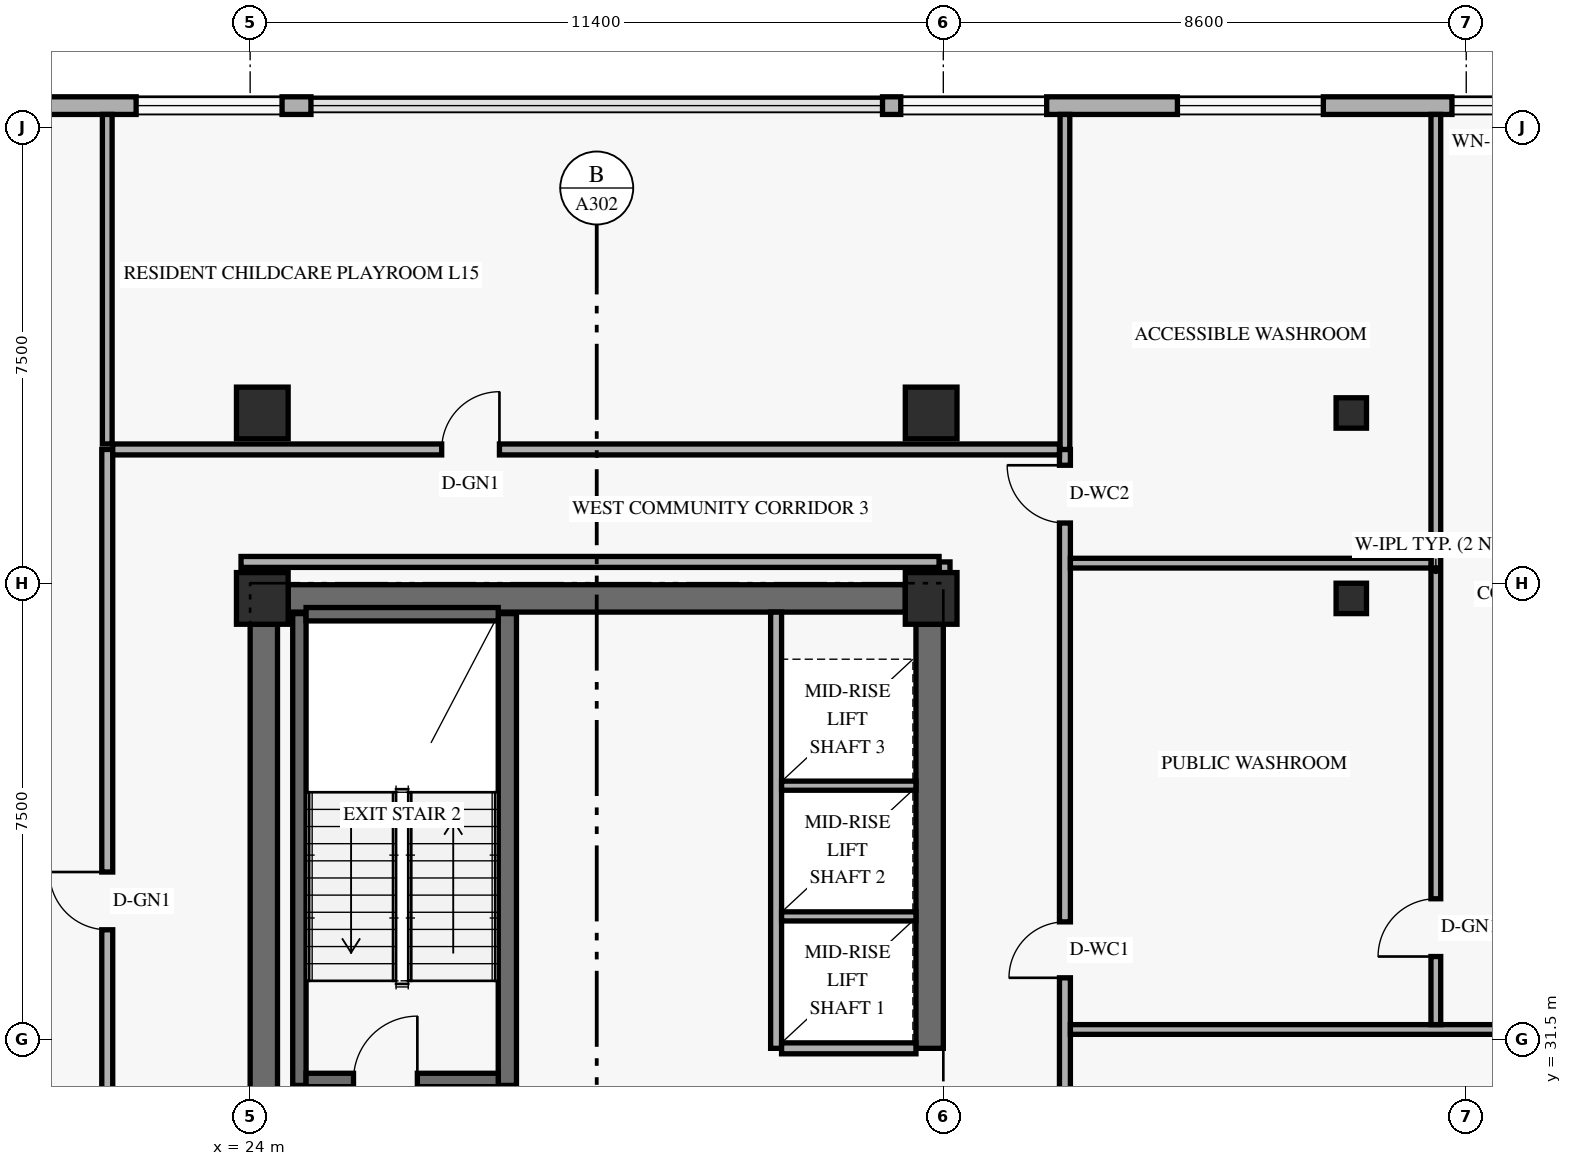
"""IFC4 building model, lengths in metres.
Left out: names, types, materials, properties, quantities, classifications, styles, units other than length and angle.
Written with IfcOpenShell. Run it as: python <this file> out.ifc"""

import sys

from ifc_helpers import new_model, si_unit, direction, frame, frame_2d, origin, origin_2d, place, context, subcontext, project, spatial, rectangle, hollow_rectangle, extrude, element, fill, save


model = new_model("IFC4")
c1 = context("Model", 3, precision=1e-05, world=origin(), true_north=direction((0.0, 1.0)))
c2 = subcontext(c1, "Body", "Model", "MODEL_VIEW")
j1 = project(units=[si_unit("LENGTHUNIT", "METRE"), si_unit("PLANEANGLEUNIT", "RADIAN")], contexts=[c1])
p1 = place(None, origin())
s1 = spatial("IfcSite", under=j1, at=p1, CompositionType="ELEMENT")
p2 = place(p1, origin())
s2 = spatial("IfcBuilding", under=s1, at=p2, CompositionType="ELEMENT")
p3 = place(p2, frame((0.0, 0.0, 60.0)))
s3 = spatial("IfcBuildingStorey", under=s2, at=p3, CompositionType="ELEMENT", Elevation=60.0)
p4 = place(p3, frame((24.225, 30.625, 0.0), z_axis=(0.0, 0.0, 1.0), x_axis=(0.0, 1.0, 0.0)))
e1 = element("IfcWall", 1, at=p4, inside=s3, PredefinedType="SHEAR", context=c2, shape_type="SweptSolid", body=[
    extrude(rectangle(XDim=7.7, YDim=0.45, at=frame_2d((3.85, 0.0))), origin(), (0.0, 0.0, 1.0), 3.267),
])
p5 = place(p3, frame((35.175, 31.35, 0.0), z_axis=(0.0, 0.0, 1.0), x_axis=(0.0, 1.0, 0.0)))
e2 = element("IfcWall", 2, at=p5, inside=s3, PredefinedType="SHEAR", context=c2, shape_type="SweptSolid", body=[
    extrude(rectangle(XDim=6.975, YDim=0.45, at=frame_2d((3.487, 0.0))), origin(), (0.0, 0.0, 1.0), 3.267),
])
p6 = place(p3, frame((24.625, 38.75, 0.0), z_axis=(0.0, 0.0, 1.0), x_axis=(1.0, 0.0, 0.0)))
e3 = element("IfcWall", 3, at=p6, inside=s3, PredefinedType="SHEAR", context=c2, shape_type="SweptSolid", body=[
    extrude(rectangle(XDim=10.15, YDim=0.45, at=frame_2d((5.075, 0.0))), origin(), (0.0, 0.0, 1.0), 3.96),
])
p7 = place(p3, frame((24.81, 30.74, 0.0), z_axis=(0.0, 0.0, 1.0), x_axis=(0.0, 1.0, 0.0)))
e4 = element("IfcWall", 4, at=p7, inside=s3, PredefinedType="SHEAR", context=c2, shape_type="SweptSolid", body=[
    extrude(rectangle(XDim=7.76, YDim=0.22, at=frame_2d((3.88, 0.0))), origin(), (0.0, 0.0, 1.0), 3.96),
])
p8 = place(p3, frame((28.23, 30.74, 0.0), z_axis=(0.0, 0.0, 1.0), x_axis=(0.0, 1.0, 0.0)))
e5 = element("IfcWall", 5, at=p8, inside=s3, PredefinedType="SHEAR", context=c2, shape_type="SweptSolid", body=[
    extrude(rectangle(XDim=7.76, YDim=0.3, at=frame_2d((3.88, 0.0))), origin(), (0.0, 0.0, 1.0), 3.96),
])
p9 = place(p3, frame((24.92, 30.83, 0.0), z_axis=(0.0, 0.0, 1.0), x_axis=(1.0, 0.0, 0.0)))
e6 = element("IfcWall", 6, at=p9, inside=s3, PredefinedType="SHEAR", context=c2, shape_type="SweptSolid", body=[
    extrude(rectangle(XDim=3.16, YDim=0.22, at=frame_2d((1.58, 0.0))), origin(), (0.0, 0.0, 1.0), 3.96),
])
p10 = place(p9, frame((0.78, 0.0, 0.0)))
e7 = element("IfcOpeningElement", 7, at=p10, cuts=e6, PredefinedType="OPENING", context=c2, shape_type="SweptSolid", body=[
    extrude(rectangle(XDim=1.05, YDim=2.15, at=frame_2d((0.525, 1.075))), frame((0.0, 0.12, 0.0), z_axis=(0.0, -1.0, 0.0), x_axis=(1.0, 0.0, 0.0)), (0.0, 0.0, 1.0), 0.24),
])
p11 = place(p3, frame((24.92, 38.49, 0.0), z_axis=(0.0, 0.0, 1.0), x_axis=(1.0, 0.0, 0.0)))
e8 = element("IfcWall", 8, at=p11, inside=s3, PredefinedType="SHEAR", context=c2, shape_type="SweptSolid", body=[
    extrude(rectangle(XDim=3.16, YDim=0.22, at=frame_2d((1.58, 0.0))), origin(), (0.0, 0.0, 1.0), 3.96),
])
for number, where, z_axis, x_axis in (
    (9, (24.2, 38.75, 0.0), (0.0, 0.0, 1.0), (1.0, 0.0, 0.0)),
    (10, (24.2, 41.8, 0.0), (0.0, 0.0, 1.0), (1.0, 0.0, 0.0)),
    (11, (35.2, 38.75, 0.0), (0.0, 0.0, 1.0), (1.0, 0.0, 0.0)),
    (12, (35.2, 41.8, 0.0), (0.0, 0.0, 1.0), (1.0, 0.0, 0.0)),
):
    element("IfcColumn", number, at=place(p3, frame(where, z_axis=z_axis, x_axis=x_axis)), inside=s3, PredefinedType="COLUMN", context=c2, shape_type="SweptSolid", body=[
        extrude(rectangle(XDim=0.85, YDim=0.85, at=origin_2d()), origin(), (0.0, 0.0, 1.0), 4.2),
    ])
for number, where, z_axis, x_axis in (
    (13, (42.036, 38.75, 0.0), (0.035, 0.0, 0.999), (0.0, 1.0, 0.0)),
    (14, (42.036, 41.8, 0.0), (0.035, 0.0, 0.999), (0.0, 1.0, 0.0)),
):
    element("IfcColumn", number, at=place(p3, frame(where, z_axis=z_axis, x_axis=x_axis)), inside=s3, PredefinedType="COLUMN", context=c2, shape_type="SweptSolid", body=[
        extrude(hollow_rectangle(XDim=0.5, YDim=0.5, WallThickness=0.022, at=origin_2d()), origin(), (0.0, 0.0, 1.0), 4.203),
    ])
p12 = place(p3, frame((44.98, 46.855, 0.0), z_axis=(0.0, 0.0, 1.0), x_axis=(-1.0, 0.0, 0.0)))
e15 = element("IfcWall", 15, at=p12, inside=s3, PredefinedType="SOLIDWALL", context=c2, shape_type="SweptSolid", body=[
    extrude(rectangle(XDim=10.58, YDim=0.29, at=frame_2d((5.29, 0.0))), origin(), (0.0, 0.0, 1.0), 3.96),
])
p13 = place(p12, frame((7.88, 0.0, 0.85)))
e16 = element("IfcOpeningElement", 16, at=p13, cuts=e15, PredefinedType="OPENING", context=c2, shape_type="SweptSolid", body=[
    extrude(rectangle(XDim=2.4, YDim=1.9, at=frame_2d((1.2, 0.95))), frame((0.0, 0.155, 0.0), z_axis=(0.0, -1.0, 0.0), x_axis=(1.0, 0.0, 0.0)), (0.0, 0.0, 1.0), 0.31),
])
p14 = place(p12, frame((3.33, 0.0, 0.85)))
e17 = element("IfcOpeningElement", 17, at=p14, cuts=e15, PredefinedType="OPENING", context=c2, shape_type="SweptSolid", body=[
    extrude(rectangle(XDim=2.4, YDim=1.9, at=frame_2d((1.2, 0.95))), frame((0.0, 0.155, 0.0), z_axis=(0.0, -1.0, 0.0), x_axis=(1.0, 0.0, 0.0)), (0.0, 0.0, 1.0), 0.31),
])
p15 = place(p12, frame((0.265, 0.0, 0.85)))
e18 = element("IfcOpeningElement", 18, at=p15, cuts=e15, PredefinedType="OPENING", context=c2, shape_type="SweptSolid", body=[
    extrude(rectangle(XDim=0.95, YDim=1.5, at=frame_2d((0.475, 0.75))), frame((0.0, 0.155, 0.0), z_axis=(0.0, -1.0, 0.0), x_axis=(1.0, 0.0, 0.0)), (0.0, 0.0, 1.0), 0.31),
])
p16 = place(p3, frame((25.0, 46.855, 0.0), z_axis=(0.0, 0.0, 1.0), x_axis=(-1.0, 0.0, 0.0)))
e19 = element("IfcWall", 19, at=p16, inside=s3, PredefinedType="SOLIDWALL", context=c2, shape_type="SweptSolid", body=[
    extrude(rectangle(XDim=19.58, YDim=0.29, at=frame_2d((9.79, 0.0))), origin(), (0.0, 0.0, 1.0), 3.96),
])
p17 = place(p16, frame((10.265, 0.0, 0.85)))
e20 = element("IfcOpeningElement", 20, at=p17, cuts=e19, PredefinedType="OPENING", context=c2, shape_type="SweptSolid", body=[
    extrude(rectangle(XDim=2.4, YDim=1.9, at=frame_2d((1.2, 0.95))), frame((0.0, 0.155, 0.0), z_axis=(0.0, -1.0, 0.0), x_axis=(1.0, 0.0, 0.0)), (0.0, 0.0, 1.0), 0.31),
])
p18 = place(p16, frame((0.475, 0.0, 0.85)))
e21 = element("IfcOpeningElement", 21, at=p18, cuts=e19, PredefinedType="OPENING", context=c2, shape_type="SweptSolid", body=[
    extrude(rectangle(XDim=2.4, YDim=1.9, at=frame_2d((1.2, 0.95))), frame((0.0, 0.155, 0.0), z_axis=(0.0, -1.0, 0.0), x_axis=(1.0, 0.0, 0.0)), (0.0, 0.0, 1.0), 0.31),
])
p19 = place(p3, frame((32.65, 31.35, 0.0), z_axis=(0.0, 0.0, 1.0), x_axis=(0.0, 1.0, 0.0)))
e22 = element("IfcWall", 22, at=p19, inside=s3, PredefinedType="STANDARD", context=c2, shape_type="SweptSolid", body=[
    extrude(rectangle(XDim=7.175, YDim=0.18, at=frame_2d((3.587, 0.0))), origin(), (0.0, 0.0, 1.0), 3.96),
])
p20 = place(p3, frame((32.74, 31.35, 0.0), z_axis=(0.0, 0.0, 1.0), x_axis=(1.0, 0.0, 0.0)))
e23 = element("IfcWall", 23, at=p20, inside=s3, PredefinedType="STANDARD", context=c2, shape_type="SweptSolid", body=[
    extrude(rectangle(XDim=2.21, YDim=0.18, at=frame_2d((1.105, 0.0))), origin(), (0.0, 0.0, 1.0), 3.96),
])
for number, where, z_axis, x_axis in (
    (24, (32.74, 33.52, 0.0), (0.0, 0.0, 1.0), (1.0, 0.0, 0.0)),
    (25, (32.74, 35.67, 0.0), (0.0, 0.0, 1.0), (1.0, 0.0, 0.0)),
):
    element("IfcWall", number, at=place(p3, frame(where, z_axis=z_axis, x_axis=x_axis)), inside=s3, PredefinedType="STANDARD", context=c2, shape_type="SweptSolid", body=[
        extrude(rectangle(XDim=2.21, YDim=0.15, at=frame_2d((1.105, 0.0))), origin(), (0.0, 0.0, 1.0), 3.96),
    ])
p21 = place(p3, frame((37.4, 6.8, 0.0), z_axis=(0.0, 0.0, 1.0), x_axis=(0.0, 1.0, 0.0)))
e26 = element("IfcWall", 26, at=p21, inside=s3, PredefinedType="STANDARD", context=c2, shape_type="SweptSolid", body=[
    extrude(rectangle(XDim=34.4, YDim=0.18, at=frame_2d((17.2, 0.0))), origin(), (0.0, 0.0, 1.0), 3.249),
])
p22 = place(p21, frame((25.71, 0.0, 0.0)))
e27 = element("IfcOpeningElement", 27, at=p22, cuts=e26, PredefinedType="OPENING", context=c2, shape_type="SweptSolid", body=[
    extrude(rectangle(XDim=0.92, YDim=2.14, at=frame_2d((0.46, 1.07))), frame((0.0, 0.1, 0.0), z_axis=(0.0, -1.0, 0.0), x_axis=(1.0, 0.0, 0.0)), (0.0, 0.0, 1.0), 0.2),
])
p23 = place(p21, frame((33.19, 0.0, 0.0)))
e28 = element("IfcOpeningElement", 28, at=p23, cuts=e26, PredefinedType="OPENING", context=c2, shape_type="SweptSolid", body=[
    extrude(rectangle(XDim=0.95, YDim=2.14, at=frame_2d((0.475, 1.07))), frame((0.0, 0.1, 0.0), z_axis=(0.0, -1.0, 0.0), x_axis=(1.0, 0.0, 0.0)), (0.0, 0.0, 1.0), 0.2),
])
p24 = place(p21, frame((2.8, 0.0, 0.0)))
e29 = element("IfcOpeningElement", 29, at=p24, cuts=e26, PredefinedType="OPENING", context=c2, shape_type="SweptSolid", body=[
    extrude(rectangle(XDim=1.15, YDim=2.15, at=frame_2d((0.575, 1.075))), frame((0.0, 0.1, 0.0), z_axis=(0.0, -1.0, 0.0), x_axis=(1.0, 0.0, 0.0)), (0.0, 0.0, 1.0), 0.2),
])
p25 = place(p21, frame((21.6, 0.0, 0.0)))
e30 = element("IfcOpeningElement", 30, at=p25, cuts=e26, PredefinedType="OPENING", context=c2, shape_type="SweptSolid", body=[
    extrude(rectangle(XDim=1.15, YDim=2.15, at=frame_2d((0.575, 1.075))), frame((0.0, 0.1, 0.0), z_axis=(0.0, -1.0, 0.0), x_axis=(1.0, 0.0, 0.0)), (0.0, 0.0, 1.0), 0.2),
])
p26 = place(p3, frame((37.4, 41.2, 0.0), z_axis=(0.0, 0.0, 1.0), x_axis=(0.0, 1.0, 0.0)))
e31 = element("IfcWall", 31, at=p26, inside=s3, PredefinedType="PARTITIONING", context=c2, shape_type="SweptSolid", body=[
    extrude(rectangle(XDim=5.51, YDim=0.16, at=frame_2d((2.755, 0.0))), origin(), (0.0, 0.0, 1.0), 3.409),
])
p27 = place(p3, frame((35.42, 38.75, 0.0), z_axis=(0.0, 0.0, 1.0), x_axis=(0.0, 1.0, 0.0)))
e32 = element("IfcWall", 32, at=p27, inside=s3, PredefinedType="STANDARD", context=c2, shape_type="SweptSolid", body=[
    extrude(rectangle(XDim=0.6, YDim=0.18, at=frame_2d((0.3, 0.0))), origin(), (0.0, 0.0, 1.0), 3.249),
])
p28 = place(p3, frame((37.49, 31.66, 0.0), z_axis=(0.0, 0.0, 1.0), x_axis=(1.0, 0.0, 0.0)))
e33 = element("IfcWall", 33, at=p28, inside=s3, PredefinedType="PARTITIONING", context=c2, shape_type="SweptSolid", body=[
    extrude(rectangle(XDim=10.82, YDim=0.16, at=frame_2d((5.41, 0.0))), origin(), (0.0, 0.0, 1.0), 3.249),
])
p29 = place(p3, frame((43.5, 31.74, 0.0), z_axis=(0.0, 0.0, 1.0), x_axis=(0.0, 1.0, 0.0)))
e34 = element("IfcWall", 34, at=p29, inside=s3, PredefinedType="PLUMBINGWALL", context=c2, shape_type="SweptSolid", body=[
    extrude(rectangle(XDim=14.97, YDim=0.16, at=frame_2d((7.485, 0.0))), origin(), (0.0, 0.0, 1.0), 3.249),
])
p30 = place(p29, frame((1.12, 0.0, 0.0)))
e35 = element("IfcOpeningElement", 35, at=p30, cuts=e34, PredefinedType="OPENING", context=c2, shape_type="SweptSolid", body=[
    extrude(rectangle(XDim=0.95, YDim=2.15, at=frame_2d((0.475, 1.075))), frame((0.0, 0.09, 0.0), z_axis=(0.0, -1.0, 0.0), x_axis=(1.0, 0.0, 0.0)), (0.0, 0.0, 1.0), 0.18),
])
p31 = place(p3, frame((37.49, 39.33, 0.0), z_axis=(0.0, 0.0, 1.0), x_axis=(1.0, 0.0, 0.0)))
e36 = element("IfcWall", 36, at=p31, inside=s3, PredefinedType="PLUMBINGWALL", context=c2, shape_type="SweptSolid", body=[
    extrude(rectangle(XDim=5.93, YDim=0.16, at=frame_2d((2.965, 0.0))), origin(), (0.0, 0.0, 1.0), 3.249),
])
p32 = place(p3, frame((21.65, 6.8, 0.0), z_axis=(0.0, 0.0, 1.0), x_axis=(0.0, 1.0, 0.0)))
e37 = element("IfcWall", 37, at=p32, inside=s3, PredefinedType="STANDARD", context=c2, shape_type="SweptSolid", body=[
    extrude(rectangle(XDim=34.4, YDim=0.18, at=frame_2d((17.2, 0.0))), origin(), (0.0, 0.0, 1.0), 3.249),
])
p33 = place(p32, frame((15.2, 0.0, 0.0)))
e38 = element("IfcOpeningElement", 38, at=p33, cuts=e37, PredefinedType="OPENING", context=c2, shape_type="SweptSolid", body=[
    extrude(rectangle(XDim=0.95, YDim=2.15, at=frame_2d((0.475, 1.075))), frame((0.0, 0.1, 0.0), z_axis=(0.0, -1.0, 0.0), x_axis=(1.0, 0.0, 0.0)), (0.0, 0.0, 1.0), 0.2),
])
p34 = place(p32, frame((6.2, 0.0, 0.0)))
e39 = element("IfcOpeningElement", 39, at=p34, cuts=e37, PredefinedType="OPENING", context=c2, shape_type="SweptSolid", body=[
    extrude(rectangle(XDim=0.95, YDim=2.15, at=frame_2d((0.475, 1.075))), frame((0.0, 0.1, 0.0), z_axis=(0.0, -1.0, 0.0), x_axis=(1.0, 0.0, 0.0)), (0.0, 0.0, 1.0), 0.2),
])
p35 = place(p32, frame((26.5, 0.0, 0.0)))
e40 = element("IfcOpeningElement", 40, at=p35, cuts=e37, PredefinedType="OPENING", context=c2, shape_type="SweptSolid", body=[
    extrude(rectangle(XDim=0.95, YDim=2.15, at=frame_2d((0.475, 1.075))), frame((0.0, 0.1, 0.0), z_axis=(0.0, -1.0, 0.0), x_axis=(1.0, 0.0, 0.0)), (0.0, 0.0, 1.0), 0.2),
])
p36 = place(p3, frame((21.74, 41.2, 0.0), z_axis=(0.0, 0.0, 1.0), x_axis=(1.0, 0.0, 0.0)))
e41 = element("IfcWall", 41, at=p36, inside=s3, PredefinedType="STANDARD", context=c2, shape_type="SweptSolid", body=[
    extrude(rectangle(XDim=15.57, YDim=0.18, at=frame_2d((7.785, 0.0))), origin(), (0.0, 0.0, 1.0), 3.249),
])
p37 = place(p36, frame((5.41, 0.0, 0.0)))
e42 = element("IfcOpeningElement", 42, at=p37, cuts=e41, PredefinedType="OPENING", context=c2, shape_type="SweptSolid", body=[
    extrude(rectangle(XDim=0.95, YDim=2.15, at=frame_2d((0.475, 1.075))), frame((0.0, 0.1, 0.0), z_axis=(0.0, -1.0, 0.0), x_axis=(1.0, 0.0, 0.0)), (0.0, 0.0, 1.0), 0.2),
])
p38 = place(p3, frame((23.85, 39.35, 0.0), z_axis=(0.0, 0.0, 1.0), x_axis=(1.0, 0.0, 0.0)))
e43 = element("IfcWall", 43, at=p38, inside=s3, PredefinedType="STANDARD", context=c2, shape_type="SweptSolid", body=[
    extrude(rectangle(XDim=11.48, YDim=0.18, at=frame_2d((5.74, 0.0))), origin(), (0.0, 0.0, 1.0), 3.249),
])
p39 = place(p3, frame((21.65, 41.29, 0.0), z_axis=(0.0, 0.0, 1.0), x_axis=(0.0, 1.0, 0.0)))
e44 = element("IfcWall", 44, at=p39, inside=s3, PredefinedType="PARTITIONING", context=c2, shape_type="SweptSolid", body=[
    extrude(rectangle(XDim=5.42, YDim=0.16, at=frame_2d((2.71, 0.0))), origin(), (0.0, 0.0, 1.0), 3.409),
])
p40 = place(p13, origin())
e45 = element("IfcWindow", 45, at=p40, inside=s3, PartitioningType="SINGLE_PANEL", PredefinedType="WINDOW", context=c2, shape_type="SweptSolid", body=[
    extrude(rectangle(XDim=2.4, YDim=1.9, at=frame_2d((1.2, 0.95))), frame((0.0, 0.03, 0.0), z_axis=(0.0, -1.0, 0.0), x_axis=(1.0, 0.0, 0.0)), (0.0, 0.0, 1.0), 0.06),
])
fill(e16, e45)
p41 = place(p14, origin())
e46 = element("IfcWindow", 46, at=p41, inside=s3, PartitioningType="SINGLE_PANEL", PredefinedType="WINDOW", context=c2, shape_type="SweptSolid", body=[
    extrude(rectangle(XDim=2.4, YDim=1.9, at=frame_2d((1.2, 0.95))), frame((0.0, 0.03, 0.0), z_axis=(0.0, -1.0, 0.0), x_axis=(1.0, 0.0, 0.0)), (0.0, 0.0, 1.0), 0.06),
])
fill(e17, e46)
p42 = place(p15, origin())
e47 = element("IfcWindow", 47, at=p42, inside=s3, PartitioningType="SINGLE_PANEL", PredefinedType="WINDOW", context=c2, shape_type="SweptSolid", body=[
    extrude(rectangle(XDim=0.95, YDim=1.5, at=frame_2d((0.475, 0.75))), frame((0.0, 0.03, 0.0), z_axis=(0.0, -1.0, 0.0), x_axis=(1.0, 0.0, 0.0)), (0.0, 0.0, 1.0), 0.06),
])
fill(e18, e47)
p43 = place(p18, origin())
e48 = element("IfcWindow", 48, at=p43, inside=s3, PartitioningType="SINGLE_PANEL", PredefinedType="WINDOW", context=c2, shape_type="SweptSolid", body=[
    extrude(rectangle(XDim=2.4, YDim=1.9, at=frame_2d((1.2, 0.95))), frame((0.0, 0.03, 0.0), z_axis=(0.0, -1.0, 0.0), x_axis=(1.0, 0.0, 0.0)), (0.0, 0.0, 1.0), 0.06),
])
fill(e21, e48)
p44 = place(p10, origin())
e49 = element("IfcDoor", 49, at=p44, inside=s3, OperationType="SINGLE_SWING_RIGHT", PredefinedType="DOOR", context=c2, shape_type="SweptSolid", body=[
    extrude(rectangle(XDim=1.05, YDim=2.15, at=frame_2d((0.525, 1.075))), frame((0.0, 0.025, 0.0), z_axis=(0.0, -1.0, 0.0), x_axis=(1.0, 0.0, 0.0)), (0.0, 0.0, 1.0), 0.05),
])
fill(e7, e49)
p45 = place(p22, origin())
e50 = element("IfcDoor", 50, at=p45, inside=s3, OperationType="SINGLE_SWING_LEFT", PredefinedType="DOOR", context=c2, shape_type="SweptSolid", body=[
    extrude(rectangle(XDim=0.92, YDim=2.14, at=frame_2d((0.46, 1.07))), frame((0.0, 0.025, 0.0), z_axis=(0.0, -1.0, 0.0), x_axis=(1.0, 0.0, 0.0)), (0.0, 0.0, 1.0), 0.05),
])
fill(e27, e50)
p46 = place(p23, origin())
e51 = element("IfcDoor", 51, at=p46, inside=s3, OperationType="SINGLE_SWING_RIGHT", PredefinedType="DOOR", context=c2, shape_type="SweptSolid", body=[
    extrude(rectangle(XDim=0.95, YDim=2.14, at=frame_2d((0.475, 1.07))), frame((0.0, 0.025, 0.0), z_axis=(0.0, -1.0, 0.0), x_axis=(1.0, 0.0, 0.0)), (0.0, 0.0, 1.0), 0.05),
])
fill(e28, e51)
p47 = place(p30, origin())
e52 = element("IfcDoor", 52, at=p47, inside=s3, OperationType="SINGLE_SWING_LEFT", PredefinedType="DOOR", context=c2, shape_type="SweptSolid", body=[
    extrude(rectangle(XDim=0.95, YDim=2.15, at=frame_2d((0.475, 1.075))), frame((0.0, 0.025, 0.0), z_axis=(0.0, -1.0, 0.0), x_axis=(1.0, 0.0, 0.0)), (0.0, 0.0, 1.0), 0.05),
])
fill(e35, e52)
p48 = place(p35, origin())
e53 = element("IfcDoor", 53, at=p48, inside=s3, OperationType="SINGLE_SWING_RIGHT", PredefinedType="DOOR", context=c2, shape_type="SweptSolid", body=[
    extrude(rectangle(XDim=0.95, YDim=2.15, at=frame_2d((0.475, 1.075))), frame((0.0, 0.025, 0.0), z_axis=(0.0, -1.0, 0.0), x_axis=(1.0, 0.0, 0.0)), (0.0, 0.0, 1.0), 0.05),
])
fill(e40, e53)
p49 = place(p37, origin())
e54 = element("IfcDoor", 54, at=p49, inside=s3, OperationType="SINGLE_SWING_RIGHT", PredefinedType="DOOR", context=c2, shape_type="SweptSolid", body=[
    extrude(rectangle(XDim=0.95, YDim=2.15, at=frame_2d((0.475, 1.075))), frame((0.0, 0.025, 0.0), z_axis=(0.0, -1.0, 0.0), x_axis=(1.0, 0.0, 0.0)), (0.0, 0.0, 1.0), 0.05),
])
fill(e42, e54)
save(model, sys.argv[1])
